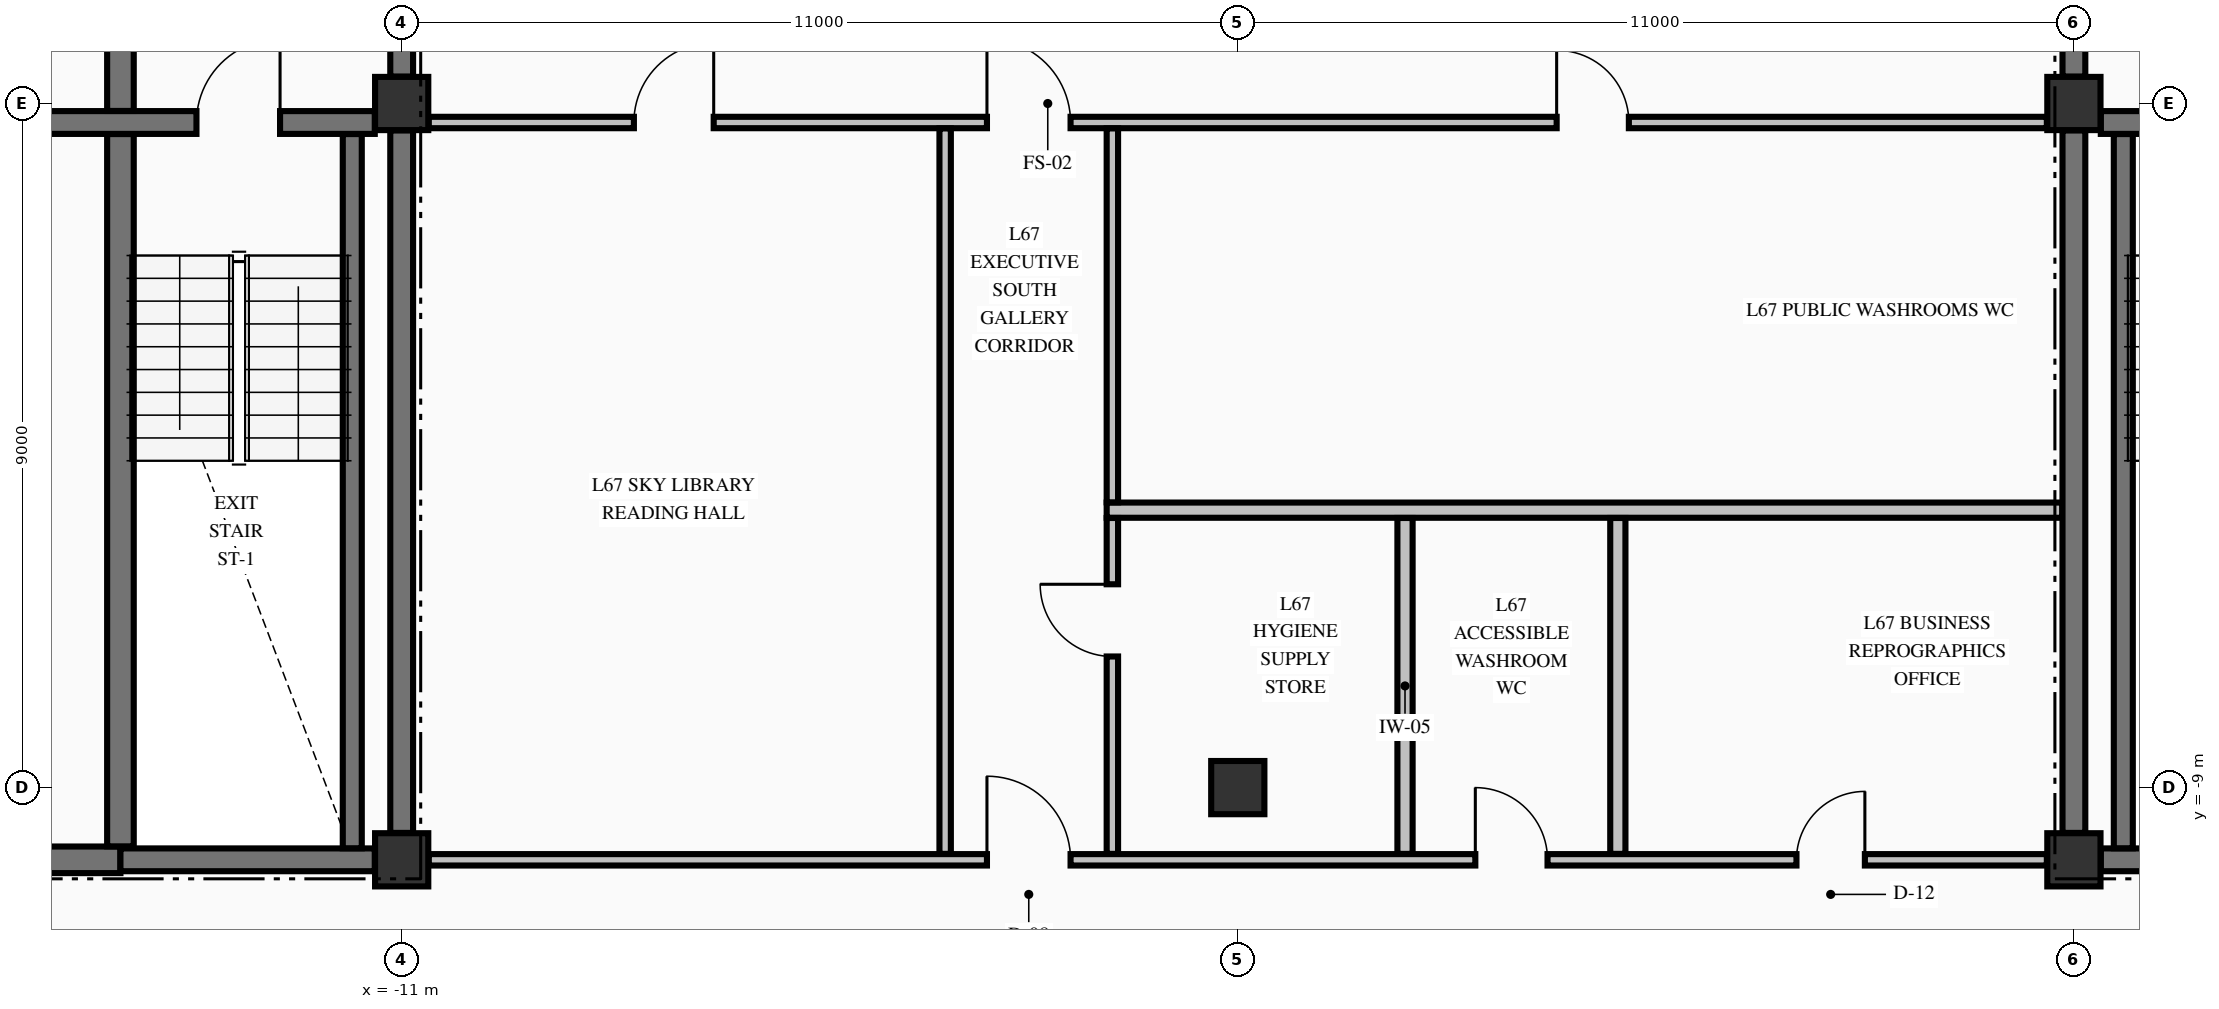
"""IFC4 building model, lengths in metres.
Left out: names, types, materials, properties, quantities, classifications, styles, units other than length and angle.
Written with IfcOpenShell. Run it as: python <this file> out.ifc"""

import sys

from ifc_helpers import new_model, si_unit, direction, frame, frame_2d, origin, origin_2d, place, context, subcontext, project, spatial, rectangle, extrude, element, fill, save


model = new_model("IFC4")
c1 = context("Model", 3, precision=1e-05, world=origin(), true_north=direction((0.0, 1.0)))
c2 = subcontext(c1, "Body", "Model", "MODEL_VIEW")
j1 = project(units=[si_unit("LENGTHUNIT", "METRE"), si_unit("PLANEANGLEUNIT", "RADIAN")], contexts=[c1])
p1 = place(None, origin())
s1 = spatial("IfcSite", under=j1, at=p1, CompositionType="ELEMENT")
p2 = place(p1, origin())
s2 = spatial("IfcBuilding", under=s1, at=p2, CompositionType="ELEMENT")
p3 = place(p2, frame((0.0, 0.0, 254.43)))
s3 = spatial("IfcBuildingStorey", under=s2, at=p3, CompositionType="ELEMENT", Elevation=254.43)
for number, where, z_axis, x_axis in (
    (1, (-11.0, -9.95, -0.425), (0.0, 0.0, 1.0), (1.0, 0.0, 0.0)),
    (2, (-11.0, 0.0, -0.425), (0.0, 0.0, 1.0), (1.0, 0.0, 0.0)),
    (3, (11.0, -9.95, -0.425), (0.0, 0.0, 1.0), (1.0, 0.0, 0.0)),
    (4, (11.0, 0.0, -0.425), (0.0, 0.0, 1.0), (1.0, 0.0, 0.0)),
    (5, (0.0, -9.0, -0.425), (0.0, 0.0, 1.0), (1.0, 0.0, 0.0)),
):
    element("IfcColumn", number, at=place(p3, frame(where, z_axis=z_axis, x_axis=x_axis)), inside=s3, PredefinedType="COLUMN", context=c2, shape_type="SweptSolid", body=[
        extrude(rectangle(XDim=0.7, YDim=0.7, at=origin_2d()), origin(), (0.0, 0.0, 1.0), 3.405),
    ])
p4 = place(p3, frame((-19.646, -9.95, 0.0), z_axis=(0.0, 0.0, 1.0), x_axis=(1.0, 0.0, 0.0)))
e6 = element("IfcWall", 6, at=p4, inside=s3, PredefinedType="SHEAR", context=c2, shape_type="SweptSolid", body=[
    extrude(rectangle(XDim=4.946, YDim=0.35, at=frame_2d((2.473, 0.0))), origin(), (0.0, 0.0, 1.0), 2.98),
])
p5 = place(p4, frame((0.821, 0.0, 0.0)))
e7 = element("IfcOpeningElement", 7, at=p5, cuts=e6, PredefinedType="OPENING", context=c2, shape_type="SweptSolid", body=[
    extrude(rectangle(XDim=1.05, YDim=2.15, at=frame_2d((0.525, 1.075))), frame((0.0, 0.185, 0.0), z_axis=(0.0, -1.0, 0.0), x_axis=(1.0, 0.0, 0.0)), (0.0, 0.0, 1.0), 0.37),
])
for number, where, z_axis, x_axis in (
    (8, (-14.7, -9.95, 0.0), (0.0, 0.0, 1.0), (1.0, 0.0, 0.0)),
    (9, (11.354, -9.95, 0.0), (0.0, 0.0, 1.0), (1.0, 0.0, 0.0)),
):
    element("IfcWall", number, at=place(p3, frame(where, z_axis=z_axis, x_axis=x_axis)), inside=s3, PredefinedType="SHEAR", context=c2, shape_type="SweptSolid", body=[
        extrude(rectangle(XDim=3.346, YDim=0.3, at=frame_2d((1.673, 0.0))), origin(), (0.0, 0.0, 1.0), 2.98),
    ])
p6 = place(p3, frame((-19.646, -0.25, 0.0), z_axis=(0.0, 0.0, 1.0), x_axis=(1.0, 0.0, 0.0)))
e10 = element("IfcWall", 10, at=p6, inside=s3, PredefinedType="SHEAR", context=c2, shape_type="SweptSolid", body=[
    extrude(rectangle(XDim=8.292, YDim=0.3, at=frame_2d((4.146, 0.0))), origin(), (0.0, 0.0, 1.0), 2.98),
])
p7 = place(p6, frame((5.946, 0.0, 0.0)))
e11 = element("IfcOpeningElement", 11, at=p7, cuts=e10, PredefinedType="OPENING", context=c2, shape_type="SweptSolid", body=[
    extrude(rectangle(XDim=1.1, YDim=2.15, at=frame_2d((0.55, 1.075))), frame((0.0, 0.16, 0.0), z_axis=(0.0, -1.0, 0.0), x_axis=(1.0, 0.0, 0.0)), (0.0, 0.0, 1.0), 0.32),
])
p8 = place(p3, frame((11.354, -0.25, 0.0), z_axis=(0.0, 0.0, 1.0), x_axis=(1.0, 0.0, 0.0)))
e12 = element("IfcWall", 12, at=p8, inside=s3, PredefinedType="SHEAR", context=c2, shape_type="SweptSolid", body=[
    extrude(rectangle(XDim=3.521, YDim=0.3, at=frame_2d((1.76, 0.0))), origin(), (0.0, 0.0, 1.0), 2.98),
])
p9 = place(p8, frame((1.246, 0.0, 0.0)))
e13 = element("IfcOpeningElement", 13, at=p9, cuts=e12, PredefinedType="OPENING", context=c2, shape_type="SweptSolid", body=[
    extrude(rectangle(XDim=1.1, YDim=2.15, at=frame_2d((0.55, 1.075))), frame((0.0, 0.16, 0.0), z_axis=(0.0, -1.0, 0.0), x_axis=(1.0, 0.0, 0.0)), (0.0, 0.0, 1.0), 0.32),
])
p10 = place(p3, frame((-10.644, -9.95, 0.0), z_axis=(0.0, 0.0, 1.0), x_axis=(1.0, 0.0, 0.0)))
e14 = element("IfcWall", 14, at=p10, inside=s3, PredefinedType="PARTITIONING", context=c2, shape_type="SweptSolid", body=[
    extrude(rectangle(XDim=21.288, YDim=0.15, at=frame_2d((10.644, 0.0))), origin(), (0.0, 0.0, 1.0), 2.98),
])
p11 = place(p10, frame((7.344, 0.0, 0.0)))
e15 = element("IfcOpeningElement", 15, at=p11, cuts=e14, PredefinedType="OPENING", context=c2, shape_type="SweptSolid", body=[
    extrude(rectangle(XDim=1.1, YDim=2.15, at=frame_2d((0.55, 1.075))), frame((0.0, 0.085, 0.0), z_axis=(0.0, -1.0, 0.0), x_axis=(1.0, 0.0, 0.0)), (0.0, 0.0, 1.0), 0.17),
])
p12 = place(p10, frame((13.769, 0.0, 0.0)))
e16 = element("IfcOpeningElement", 16, at=p12, cuts=e14, PredefinedType="OPENING", context=c2, shape_type="SweptSolid", body=[
    extrude(rectangle(XDim=0.95, YDim=2.15, at=frame_2d((0.475, 1.075))), frame((0.0, 0.085, 0.0), z_axis=(0.0, -1.0, 0.0), x_axis=(1.0, 0.0, 0.0)), (0.0, 0.0, 1.0), 0.17),
])
p13 = place(p10, frame((17.994, 0.0, 0.0)))
e17 = element("IfcOpeningElement", 17, at=p13, cuts=e14, PredefinedType="OPENING", context=c2, shape_type="SweptSolid", body=[
    extrude(rectangle(XDim=0.9, YDim=2.15, at=frame_2d((0.45, 1.075))), frame((0.0, 0.085, 0.0), z_axis=(0.0, -1.0, 0.0), x_axis=(1.0, 0.0, 0.0)), (0.0, 0.0, 1.0), 0.17),
])
p14 = place(p3, frame((-1.725, -5.35, 0.0), z_axis=(0.0, 0.0, 1.0), x_axis=(1.0, 0.0, 0.0)))
e18 = element("IfcWall", 18, at=p14, inside=s3, PredefinedType="PARTITIONING", context=c2, shape_type="SweptSolid", body=[
    extrude(rectangle(XDim=12.572, YDim=0.2, at=frame_2d((6.286, 0.0))), origin(), (0.0, 0.0, 1.0), 2.98),
])
p15 = place(p3, frame((-10.644, -0.25, 0.0), z_axis=(0.0, 0.0, 1.0), x_axis=(1.0, 0.0, 0.0)))
e19 = element("IfcWall", 19, at=p15, inside=s3, PredefinedType="PARTITIONING", context=c2, shape_type="SweptSolid", body=[
    extrude(rectangle(XDim=21.288, YDim=0.15, at=frame_2d((10.644, 0.0))), origin(), (0.0, 0.0, 1.0), 2.98),
])
p16 = place(p15, frame((7.344, 0.0, 0.0)))
e20 = element("IfcOpeningElement", 20, at=p16, cuts=e19, PredefinedType="OPENING", context=c2, shape_type="SweptSolid", body=[
    extrude(rectangle(XDim=1.1, YDim=2.15, at=frame_2d((0.55, 1.075))), frame((0.0, 0.085, 0.0), z_axis=(0.0, -1.0, 0.0), x_axis=(1.0, 0.0, 0.0)), (0.0, 0.0, 1.0), 0.17),
])
p17 = place(p15, frame((2.699, 0.0, 0.0)))
e21 = element("IfcOpeningElement", 21, at=p17, cuts=e19, PredefinedType="OPENING", context=c2, shape_type="SweptSolid", body=[
    extrude(rectangle(XDim=1.05, YDim=2.15, at=frame_2d((0.525, 1.075))), frame((0.0, 0.085, 0.0), z_axis=(0.0, -1.0, 0.0), x_axis=(1.0, 0.0, 0.0)), (0.0, 0.0, 1.0), 0.17),
])
p18 = place(p15, frame((14.839, 0.0, 0.0)))
e22 = element("IfcOpeningElement", 22, at=p18, cuts=e19, PredefinedType="OPENING", context=c2, shape_type="SweptSolid", body=[
    extrude(rectangle(XDim=0.95, YDim=2.15, at=frame_2d((0.475, 1.075))), frame((0.0, 0.085, 0.0), z_axis=(0.0, -1.0, 0.0), x_axis=(1.0, 0.0, 0.0)), (0.0, 0.0, 1.0), 0.17),
])
p19 = place(p3, frame((-14.7, -9.773, 0.0), z_axis=(0.0, 0.0, 1.0), x_axis=(0.0, 1.0, 0.0)))
e23 = element("IfcWall", 23, at=p19, inside=s3, PredefinedType="SHEAR", context=c2, shape_type="SweptSolid", body=[
    extrude(rectangle(XDim=9.371, YDim=0.35, at=frame_2d((4.686, 0.0))), origin(), (0.0, 0.0, 1.0), 2.98),
])
p20 = place(p3, frame((-14.7, -0.098, 0.0), z_axis=(0.0, 0.0, 1.0), x_axis=(0.0, 1.0, 0.0)))
e24 = element("IfcWall", 24, at=p20, inside=s3, PredefinedType="SHEAR", context=c2, shape_type="SweptSolid", body=[
    extrude(rectangle(XDim=2.846, YDim=0.35, at=frame_2d((1.423, 0.0))), origin(), (0.0, 0.0, 1.0), 2.98),
])
p21 = place(p3, frame((-11.65, -9.798, 0.0), z_axis=(0.0, 0.0, 1.0), x_axis=(0.0, 1.0, 0.0)))
e25 = element("IfcWall", 25, at=p21, inside=s3, PredefinedType="SOLIDWALL", context=c2, shape_type="SweptSolid", body=[
    extrude(rectangle(XDim=9.396, YDim=0.25, at=frame_2d((4.698, 0.0))), origin(), (0.0, 0.0, 1.0), 2.98),
])
p22 = place(p3, frame((-11.0, -9.596, 0.0), z_axis=(0.0, 0.0, 1.0), x_axis=(0.0, 1.0, 0.0)))
e26 = element("IfcWall", 26, at=p22, inside=s3, PredefinedType="SHEAR", context=c2, shape_type="SweptSolid", body=[
    extrude(rectangle(XDim=9.242, YDim=0.3, at=frame_2d((4.621, 0.0))), origin(), (0.0, 0.0, 1.0), 2.98),
])
p23 = place(p3, frame((-11.0, 0.354, 0.0), z_axis=(0.0, 0.0, 1.0), x_axis=(0.0, 1.0, 0.0)))
e27 = element("IfcWall", 27, at=p23, inside=s3, PredefinedType="SHEAR", context=c2, shape_type="SweptSolid", body=[
    extrude(rectangle(XDim=2.394, YDim=0.3, at=frame_2d((1.197, 0.0))), origin(), (0.0, 0.0, 1.0), 2.98),
])
p24 = place(p23, frame((0.746, 0.0, 0.0)))
e28 = element("IfcOpeningElement", 28, at=p24, cuts=e27, PredefinedType="OPENING", context=c2, shape_type="SweptSolid", body=[
    extrude(rectangle(XDim=1.1, YDim=2.15, at=frame_2d((0.55, 1.075))), frame((0.0, 0.16, 0.0), z_axis=(0.0, -1.0, 0.0), x_axis=(1.0, 0.0, 0.0)), (0.0, 0.0, 1.0), 0.32),
])
p25 = place(p3, frame((11.0, -9.596, 0.0), z_axis=(0.0, 0.0, 1.0), x_axis=(0.0, 1.0, 0.0)))
e29 = element("IfcWall", 29, at=p25, inside=s3, PredefinedType="SHEAR", context=c2, shape_type="SweptSolid", body=[
    extrude(rectangle(XDim=9.242, YDim=0.3, at=frame_2d((4.621, 0.0))), origin(), (0.0, 0.0, 1.0), 2.98),
])
p26 = place(p3, frame((11.0, 0.354, 0.0), z_axis=(0.0, 0.0, 1.0), x_axis=(0.0, 1.0, 0.0)))
e30 = element("IfcWall", 30, at=p26, inside=s3, PredefinedType="SHEAR", context=c2, shape_type="SweptSolid", body=[
    extrude(rectangle(XDim=2.394, YDim=0.3, at=frame_2d((1.197, 0.0))), origin(), (0.0, 0.0, 1.0), 2.98),
])
p27 = place(p26, frame((0.746, 0.0, 0.0)))
e31 = element("IfcOpeningElement", 31, at=p27, cuts=e30, PredefinedType="OPENING", context=c2, shape_type="SweptSolid", body=[
    extrude(rectangle(XDim=1.1, YDim=2.15, at=frame_2d((0.55, 1.075))), frame((0.0, 0.16, 0.0), z_axis=(0.0, -1.0, 0.0), x_axis=(1.0, 0.0, 0.0)), (0.0, 0.0, 1.0), 0.32),
])
p28 = place(p3, frame((11.65, -9.798, 0.0), z_axis=(0.0, 0.0, 1.0), x_axis=(0.0, 1.0, 0.0)))
e32 = element("IfcWall", 32, at=p28, inside=s3, PredefinedType="SOLIDWALL", context=c2, shape_type="SweptSolid", body=[
    extrude(rectangle(XDim=9.396, YDim=0.25, at=frame_2d((4.698, 0.0))), origin(), (0.0, 0.0, 1.0), 2.98),
])
p29 = place(p3, frame((-3.85, -9.872, 0.0), z_axis=(0.0, 0.0, 1.0), x_axis=(0.0, 1.0, 0.0)))
e33 = element("IfcWall", 33, at=p29, inside=s3, PredefinedType="PARTITIONING", context=c2, shape_type="SweptSolid", body=[
    extrude(rectangle(XDim=9.544, YDim=0.15, at=frame_2d((4.772, 0.0))), origin(), (0.0, 0.0, 1.0), 2.98),
])
p30 = place(p3, frame((-1.65, -9.872, 0.0), z_axis=(0.0, 0.0, 1.0), x_axis=(0.0, 1.0, 0.0)))
e34 = element("IfcWall", 34, at=p30, inside=s3, PredefinedType="PARTITIONING", context=c2, shape_type="SweptSolid", body=[
    extrude(rectangle(XDim=4.419, YDim=0.15, at=frame_2d((2.209, 0.0))), origin(), (0.0, 0.0, 1.0), 2.98),
])
p31 = place(p30, frame((2.597, 0.0, 0.0)))
e35 = element("IfcOpeningElement", 35, at=p31, cuts=e34, PredefinedType="OPENING", context=c2, shape_type="SweptSolid", body=[
    extrude(rectangle(XDim=0.95, YDim=2.15, at=frame_2d((0.475, 1.075))), frame((0.0, 0.085, 0.0), z_axis=(0.0, -1.0, 0.0), x_axis=(1.0, 0.0, 0.0)), (0.0, 0.0, 1.0), 0.17),
])
p32 = place(p3, frame((-1.65, -5.247, 0.0), z_axis=(0.0, 0.0, 1.0), x_axis=(0.0, 1.0, 0.0)))
e36 = element("IfcWall", 36, at=p32, inside=s3, PredefinedType="PARTITIONING", context=c2, shape_type="SweptSolid", body=[
    extrude(rectangle(XDim=4.919, YDim=0.15, at=frame_2d((2.459, 0.0))), origin(), (0.0, 0.0, 1.0), 2.98),
])
for number, where, z_axis, x_axis in (
    (37, (2.2, -9.872, 0.0), (0.0, 0.0, 1.0), (0.0, 1.0, 0.0)),
    (38, (5.0, -9.872, 0.0), (0.0, 0.0, 1.0), (0.0, 1.0, 0.0)),
):
    element("IfcWall", number, at=place(p3, frame(where, z_axis=z_axis, x_axis=x_axis)), inside=s3, PredefinedType="PARTITIONING", context=c2, shape_type="SweptSolid", body=[
        extrude(rectangle(XDim=4.419, YDim=0.2, at=frame_2d((2.209, 0.0))), origin(), (0.0, 0.0, 1.0), 2.98),
    ])
p33 = place(p7, origin())
e39 = element("IfcDoor", 39, at=p33, inside=s3, OperationType="SINGLE_SWING_RIGHT", PredefinedType="DOOR", context=c2, shape_type="SweptSolid", body=[
    extrude(rectangle(XDim=1.1, YDim=2.15, at=frame_2d((0.55, 1.075))), frame((0.0, 0.025, 0.0), z_axis=(0.0, -1.0, 0.0), x_axis=(1.0, 0.0, 0.0)), (0.0, 0.0, 1.0), 0.05),
])
fill(e11, e39)
p34 = place(p11, origin())
e40 = element("IfcDoor", 40, at=p34, inside=s3, OperationType="SINGLE_SWING_LEFT", PredefinedType="DOOR", context=c2, shape_type="SweptSolid", body=[
    extrude(rectangle(XDim=1.1, YDim=2.15, at=frame_2d((0.55, 1.075))), frame((0.0, 0.025, 0.0), z_axis=(0.0, -1.0, 0.0), x_axis=(1.0, 0.0, 0.0)), (0.0, 0.0, 1.0), 0.05),
])
fill(e15, e40)
p35 = place(p16, origin())
e41 = element("IfcDoor", 41, at=p35, inside=s3, OperationType="SINGLE_SWING_LEFT", PredefinedType="DOOR", context=c2, shape_type="SweptSolid", body=[
    extrude(rectangle(XDim=1.1, YDim=2.15, at=frame_2d((0.55, 1.075))), frame((0.0, 0.025, 0.0), z_axis=(0.0, -1.0, 0.0), x_axis=(1.0, 0.0, 0.0)), (0.0, 0.0, 1.0), 0.05),
])
fill(e20, e41)
p36 = place(p17, origin())
e42 = element("IfcDoor", 42, at=p36, inside=s3, OperationType="SINGLE_SWING_RIGHT", PredefinedType="DOOR", context=c2, shape_type="SweptSolid", body=[
    extrude(rectangle(XDim=1.05, YDim=2.15, at=frame_2d((0.525, 1.075))), frame((0.0, 0.025, 0.0), z_axis=(0.0, -1.0, 0.0), x_axis=(1.0, 0.0, 0.0)), (0.0, 0.0, 1.0), 0.05),
])
fill(e21, e42)
p37 = place(p18, origin())
e43 = element("IfcDoor", 43, at=p37, inside=s3, OperationType="SINGLE_SWING_LEFT", PredefinedType="DOOR", context=c2, shape_type="SweptSolid", body=[
    extrude(rectangle(XDim=0.95, YDim=2.15, at=frame_2d((0.475, 1.075))), frame((0.0, 0.025, 0.0), z_axis=(0.0, -1.0, 0.0), x_axis=(1.0, 0.0, 0.0)), (0.0, 0.0, 1.0), 0.05),
])
fill(e22, e43)
p38 = place(p31, origin())
e44 = element("IfcDoor", 44, at=p38, inside=s3, OperationType="SINGLE_SWING_RIGHT", PredefinedType="DOOR", context=c2, shape_type="SweptSolid", body=[
    extrude(rectangle(XDim=0.95, YDim=2.15, at=frame_2d((0.475, 1.075))), frame((0.0, 0.025, 0.0), z_axis=(0.0, -1.0, 0.0), x_axis=(1.0, 0.0, 0.0)), (0.0, 0.0, 1.0), 0.05),
])
fill(e35, e44)
p39 = place(p12, origin())
e45 = element("IfcDoor", 45, at=p39, inside=s3, OperationType="SINGLE_SWING_LEFT", PredefinedType="DOOR", context=c2, shape_type="SweptSolid", body=[
    extrude(rectangle(XDim=0.95, YDim=2.15, at=frame_2d((0.475, 1.075))), frame((0.0, 0.025, 0.0), z_axis=(0.0, -1.0, 0.0), x_axis=(1.0, 0.0, 0.0)), (0.0, 0.0, 1.0), 0.05),
])
fill(e16, e45)
p40 = place(p13, origin())
e46 = element("IfcDoor", 46, at=p40, inside=s3, OperationType="SINGLE_SWING_RIGHT", PredefinedType="DOOR", context=c2, shape_type="SweptSolid", body=[
    extrude(rectangle(XDim=0.9, YDim=2.15, at=frame_2d((0.45, 1.075))), frame((0.0, 0.025, 0.0), z_axis=(0.0, -1.0, 0.0), x_axis=(1.0, 0.0, 0.0)), (0.0, 0.0, 1.0), 0.05),
])
fill(e17, e46)
save(model, sys.argv[1])
